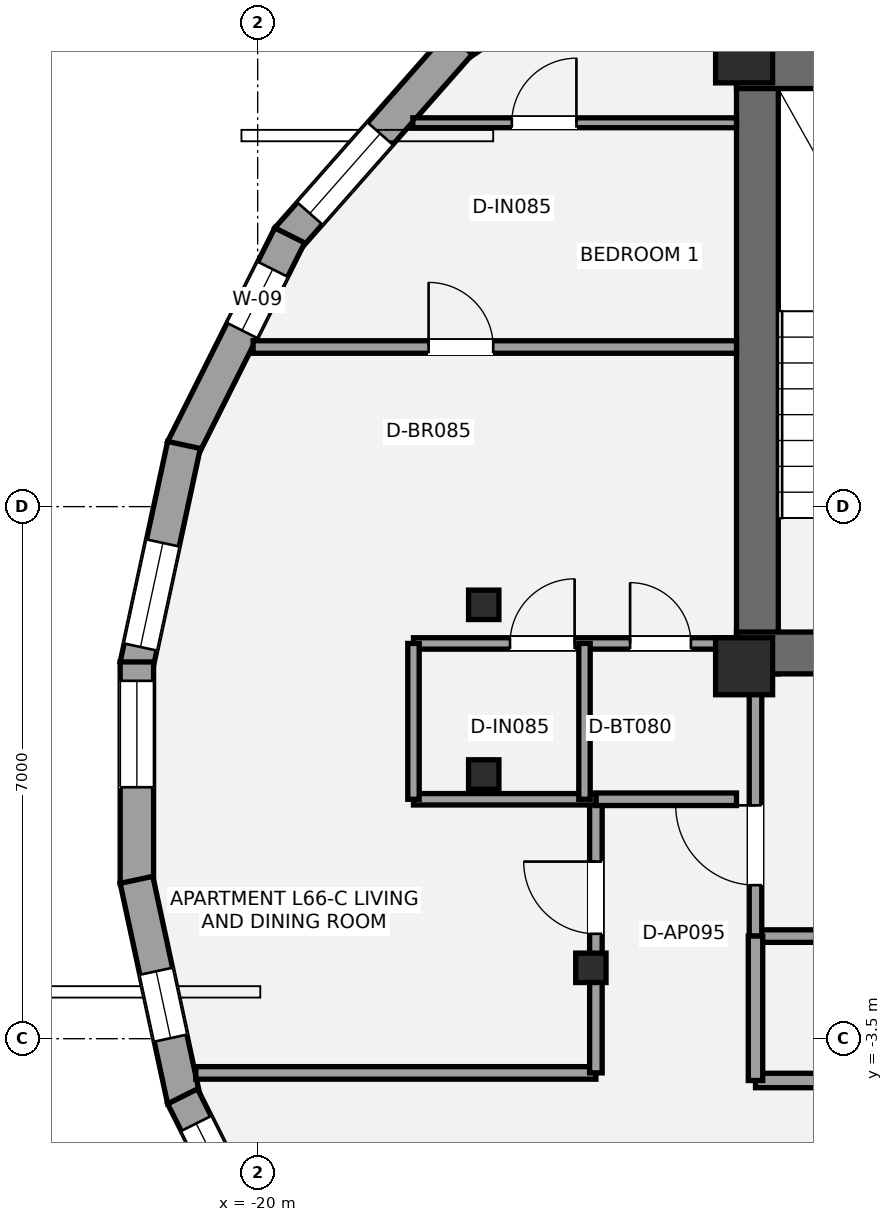
"""IFC4 building model, lengths in metres.
Left out: names, types, materials, properties, quantities, classifications, styles, units other than length and angle.
Written with IfcOpenShell. Run it as: python <this file> out.ifc"""

import sys

from ifc_helpers import new_model, si_unit, direction, frame, frame_2d, origin, origin_2d, place, context, subcontext, project, spatial, rectangle, i_section, extrude, element, fill, save


model = new_model("IFC4")
c1 = context("Model", 3, precision=1e-05, world=origin(), true_north=direction((0.0, 1.0)))
c2 = subcontext(c1, "Body", "Model", "MODEL_VIEW")
j1 = project(units=[si_unit("LENGTHUNIT", "METRE"), si_unit("PLANEANGLEUNIT", "RADIAN")], contexts=[c1])
p1 = place(None, origin())
s1 = spatial("IfcSite", under=j1, at=p1, CompositionType="ELEMENT")
p2 = place(p1, origin())
s2 = spatial("IfcBuilding", under=s1, at=p2, CompositionType="ELEMENT")
p3 = place(p2, frame((0.0, 0.0, 235.2)))
s3 = spatial("IfcBuildingStorey", under=s2, at=p3, CompositionType="ELEMENT", Elevation=235.2)
p4 = place(p3, frame((-13.425, 1.3, 0.0), z_axis=(0.0, 0.0, 1.0), x_axis=(0.0, 1.0, 0.0)))
e1 = element("IfcWall", 1, at=p4, inside=s3, PredefinedType="SHEAR", context=c2, shape_type="SweptSolid", body=[
    extrude(rectangle(XDim=8.25, YDim=0.55, at=frame_2d((4.125, 0.0))), origin(), (0.0, 0.0, 1.0), 3.15),
])
p5 = place(p3, frame((-13.7, 9.275, 0.0), z_axis=(0.0, 0.0, 1.0), x_axis=(1.0, 0.0, 0.0)))
e2 = element("IfcWall", 2, at=p5, inside=s3, PredefinedType="SHEAR", context=c2, shape_type="SweptSolid", body=[
    extrude(rectangle(XDim=9.175, YDim=0.55, at=frame_2d((4.587, 0.0))), origin(), (0.0, 0.0, 1.0), 3.15),
])
p6 = place(p3, frame((-4.925, 1.575, 0.0), z_axis=(0.0, 0.0, 1.0), x_axis=(-1.0, 0.0, 0.0)))
e3 = element("IfcWall", 3, at=p6, inside=s3, PredefinedType="SHEAR", context=c2, shape_type="SweptSolid", body=[
    extrude(rectangle(XDim=8.775, YDim=0.55, at=frame_2d((4.387, 0.0))), origin(), (0.0, 0.0, 1.0), 3.15),
])
p7 = place(p6, frame((5.375, 0.0, 0.0)))
e4 = element("IfcOpeningElement", 4, at=p7, cuts=e3, PredefinedType="OPENING", context=c2, shape_type="SweptSolid", body=[
    extrude(rectangle(XDim=1.05, YDim=2.15, at=frame_2d((0.525, 1.075))), frame((0.0, 0.285, 0.0), z_axis=(0.0, -1.0, 0.0), x_axis=(1.0, 0.0, 0.0)), (0.0, 0.0, 1.0), 0.57),
])
p8 = place(p6, frame((3.705, 0.0, 0.0)))
e5 = element("IfcOpeningElement", 5, at=p8, cuts=e3, PredefinedType="OPENING", context=c2, shape_type="SweptSolid", body=[
    extrude(rectangle(XDim=1.1, YDim=2.2, at=frame_2d((0.55, 1.1))), frame((0.0, 0.285, 0.0), z_axis=(0.0, -1.0, 0.0), x_axis=(1.0, 0.0, 0.0)), (0.0, 0.0, 1.0), 0.57),
])
for number, where, z_axis, x_axis in (
    (6, (-13.6, 1.4, 0.0), (0.0, 0.0, 1.0), (1.0, 0.0, 0.0)),
    (7, (-13.6, 9.45, 0.0), (0.0, 0.0, 1.0), (1.0, 0.0, 0.0)),
):
    element("IfcColumn", number, at=place(p3, frame(where, z_axis=z_axis, x_axis=x_axis)), inside=s3, PredefinedType="PILASTER", context=c2, shape_type="SweptSolid", body=[
        extrude(rectangle(XDim=0.75, YDim=0.75, at=origin_2d()), origin(), (0.0, 0.0, 1.0), 3.15),
    ])
for number, where, z_axis, x_axis in (
    (8, (-17.026, 2.208, 0.0), (0.0, 0.0, 1.0), (1.0, 0.0, 0.0)),
    (9, (-17.026, -0.024, 0.0), (0.0, 0.0, 1.0), (1.0, 0.0, 0.0)),
    (10, (-15.616, -2.567, 0.0), (0.0, 0.0, 1.0), (1.0, 0.0, 0.0)),
):
    element("IfcColumn", number, at=place(p3, frame(where, z_axis=z_axis, x_axis=x_axis)), inside=s3, PredefinedType="COLUMN", context=c2, shape_type="SweptSolid", body=[
        extrude(i_section(OverallWidth=0.399, OverallDepth=0.387, WebThickness=0.021, FlangeThickness=0.033, at=origin_2d()), origin(), (0.0, 0.0, 1.0), 3.15),
    ])
p9 = place(p3, frame((-17.381, 9.559, 0.0), z_axis=(0.0, 0.0, 1.0), x_axis=(0.827637036896, 0.561263694851, 0.0)))
e11 = element("IfcWall", 11, at=p9, inside=s3, PredefinedType="STANDARD", context=c2, shape_type="SweptSolid", body=[
    extrude(rectangle(XDim=3.793, YDim=0.44, at=frame_2d((1.896, 0.0))), origin(), (0.0, 0.0, 1.0), 2.336),
])
p10 = place(p9, frame((1.544, 0.0, 0.55)))
e12 = element("IfcOpeningElement", 12, at=p10, cuts=e11, PredefinedType="OPENING", context=c2, shape_type="SweptSolid", body=[
    extrude(rectangle(XDim=1.75, YDim=1.55, at=frame_2d((0.875, 0.775))), frame((0.0, 0.23, 0.0), z_axis=(0.0, -1.0, 0.0), x_axis=(1.0, 0.0, 0.0)), (0.0, 0.0, 1.0), 0.46),
])
p11 = place(p3, frame((-19.61, 7.022, 0.0), z_axis=(0.0, 0.0, 1.0), x_axis=(0.66136043846, 0.750068243855, 0.0)))
e13 = element("IfcWall", 13, at=p11, inside=s3, PredefinedType="STANDARD", context=c2, shape_type="SweptSolid", body=[
    extrude(rectangle(XDim=3.432, YDim=0.44, at=frame_2d((1.716, 0.0))), origin(), (0.0, 0.0, 1.0), 2.336),
])
p12 = place(p11, frame((0.447, 0.0, 0.58)))
e14 = element("IfcOpeningElement", 14, at=p12, cuts=e13, PredefinedType="OPENING", context=c2, shape_type="SweptSolid", body=[
    extrude(rectangle(XDim=1.4, YDim=1.55, at=frame_2d((0.7, 0.775))), frame((0.0, 0.23, 0.0), z_axis=(0.0, -1.0, 0.0), x_axis=(1.0, 0.0, 0.0)), (0.0, 0.0, 1.0), 0.46),
])
p13 = place(p3, frame((-20.988, 4.259, 0.0), z_axis=(0.0, 0.0, 1.0), x_axis=(0.448424724145, 0.893820601002, 0.0)))
e15 = element("IfcWall", 15, at=p13, inside=s3, PredefinedType="STANDARD", context=c2, shape_type="SweptSolid", body=[
    extrude(rectangle(XDim=3.144, YDim=0.44, at=frame_2d((1.572, 0.0))), origin(), (0.0, 0.0, 1.0), 2.336),
])
p14 = place(p13, frame((1.745, 0.0, 0.58)))
e16 = element("IfcOpeningElement", 16, at=p14, cuts=e15, PredefinedType="OPENING", context=c2, shape_type="SweptSolid", body=[
    extrude(rectangle(XDim=0.9, YDim=1.35, at=frame_2d((0.45, 0.675))), frame((0.0, 0.23, 0.0), z_axis=(0.0, -1.0, 0.0), x_axis=(1.0, 0.0, 0.0)), (0.0, 0.0, 1.0), 0.46),
])
p15 = place(p3, frame((-21.594, 1.41, 0.0), z_axis=(0.0, 0.0, 1.0), x_axis=(0.210540350534, 0.977585168053, 0.0)))
e17 = element("IfcWall", 17, at=p15, inside=s3, PredefinedType="STANDARD", context=c2, shape_type="SweptSolid", body=[
    extrude(rectangle(XDim=2.967, YDim=0.44, at=frame_2d((1.484, 0.0))), origin(), (0.0, 0.0, 1.0), 2.336),
])
p16 = place(p15, frame((0.249, 0.0, 0.58)))
e18 = element("IfcOpeningElement", 18, at=p16, cuts=e17, PredefinedType="OPENING", context=c2, shape_type="SweptSolid", body=[
    extrude(rectangle(XDim=1.4, YDim=1.55, at=frame_2d((0.7, 0.775))), frame((0.0, 0.23, 0.0), z_axis=(0.0, -1.0, 0.0), x_axis=(1.0, 0.0, 0.0)), (0.0, 0.0, 1.0), 0.46),
])
p17 = place(p3, frame((-21.589, -1.457, 0.0), z_axis=(0.0, 0.0, 1.0), x_axis=(0.0, 1.0, 0.0)))
e19 = element("IfcWall", 19, at=p17, inside=s3, PredefinedType="STANDARD", context=c2, shape_type="SweptSolid", body=[
    extrude(rectangle(XDim=2.913, YDim=0.44, at=frame_2d((1.457, 0.0))), origin(), (0.0, 0.0, 1.0), 2.336),
])
p18 = place(p17, frame((1.265, 0.0, 0.55)))
e20 = element("IfcOpeningElement", 20, at=p18, cuts=e19, PredefinedType="OPENING", context=c2, shape_type="SweptSolid", body=[
    extrude(rectangle(XDim=1.4, YDim=1.55, at=frame_2d((0.7, 0.775))), frame((0.0, 0.23, 0.0), z_axis=(0.0, -1.0, 0.0), x_axis=(1.0, 0.0, 0.0)), (0.0, 0.0, 1.0), 0.46),
])
p19 = place(p3, frame((-20.969, -4.311, 0.0), z_axis=(0.0, 0.0, 1.0), x_axis=(-0.210540350534, 0.977585168053, 0.0)))
e21 = element("IfcWall", 21, at=p19, inside=s3, PredefinedType="STANDARD", context=c2, shape_type="SweptSolid", body=[
    extrude(rectangle(XDim=2.967, YDim=0.44, at=frame_2d((1.484, 0.0))), origin(), (0.0, 0.0, 1.0), 2.336),
])
p20 = place(p19, frame((0.838, 0.0, 0.58)))
e22 = element("IfcOpeningElement", 22, at=p20, cuts=e21, PredefinedType="OPENING", context=c2, shape_type="SweptSolid", body=[
    extrude(rectangle(XDim=0.9, YDim=1.35, at=frame_2d((0.45, 0.675))), frame((0.0, 0.23, 0.0), z_axis=(0.0, -1.0, 0.0), x_axis=(1.0, 0.0, 0.0)), (0.0, 0.0, 1.0), 0.46),
])
p21 = place(p3, frame((-19.578, -7.069, 0.0), z_axis=(0.0, 0.0, 1.0), x_axis=(-0.448424724145, 0.893820601002, 0.0)))
e23 = element("IfcWall", 23, at=p21, inside=s3, PredefinedType="STANDARD", context=c2, shape_type="SweptSolid", body=[
    extrude(rectangle(XDim=3.144, YDim=0.44, at=frame_2d((1.572, 0.0))), origin(), (0.0, 0.0, 1.0), 2.336),
])
p22 = place(p21, frame((1.344, 0.0, 0.58)))
e24 = element("IfcOpeningElement", 24, at=p22, cuts=e23, PredefinedType="OPENING", context=c2, shape_type="SweptSolid", body=[
    extrude(rectangle(XDim=1.4, YDim=1.55, at=frame_2d((0.7, 0.775))), frame((0.0, 0.23, 0.0), z_axis=(0.0, -1.0, 0.0), x_axis=(1.0, 0.0, 0.0)), (0.0, 0.0, 1.0), 0.46),
])
p23 = place(p3, frame((-13.45, -2.15, 0.0), z_axis=(0.0, 0.0, 1.0), x_axis=(1.0, 0.0, 0.0)))
e25 = element("IfcWall", 25, at=p23, inside=s3, PredefinedType="PARTITIONING", context=c2, shape_type="SweptSolid", body=[
    extrude(rectangle(XDim=6.25, YDim=0.165, at=frame_2d((3.125, 0.0))), origin(), (0.0, 0.0, 1.0), 2.423),
])
p24 = place(p3, frame((-13.45, -2.15, 0.0), z_axis=(0.0, 0.0, 1.0), x_axis=(0.0, 1.0, 0.0)))
e26 = element("IfcWall", 26, at=p24, inside=s3, PredefinedType="PARTITIONING", context=c2, shape_type="SweptSolid", body=[
    extrude(rectangle(XDim=3.5, YDim=0.165, at=frame_2d((1.75, 0.0))), origin(), (0.0, 0.0, 1.0), 2.423),
])
p25 = place(p24, frame((0.67, 0.0, 0.0)))
e27 = element("IfcOpeningElement", 27, at=p25, cuts=e26, PredefinedType="OPENING", context=c2, shape_type="SweptSolid", body=[
    extrude(rectangle(XDim=1.05, YDim=2.15, at=frame_2d((0.525, 1.075))), frame((0.0, 0.093, 0.0), z_axis=(0.0, -1.0, 0.0), x_axis=(1.0, 0.0, 0.0)), (0.0, 0.0, 1.0), 0.185),
])
p26 = place(p3, frame((-13.45, -4.05, 0.0), z_axis=(0.0, 0.0, 1.0), x_axis=(1.0, 0.0, 0.0)))
e28 = element("IfcWall", 28, at=p26, inside=s3, PredefinedType="PLUMBINGWALL", context=c2, shape_type="SweptSolid", body=[
    extrude(rectangle(XDim=11.35, YDim=0.19, at=frame_2d((5.675, 0.0))), origin(), (0.0, 0.0, 1.0), 2.357),
])
p27 = place(p26, frame((1.25, 0.0, 0.0)))
e29 = element("IfcOpeningElement", 29, at=p27, cuts=e28, PredefinedType="OPENING", context=c2, shape_type="SweptSolid", body=[
    extrude(rectangle(XDim=0.95, YDim=2.15, at=frame_2d((0.475, 1.075))), frame((0.0, 0.105, 0.0), z_axis=(0.0, -1.0, 0.0), x_axis=(1.0, 0.0, 0.0)), (0.0, 0.0, 1.0), 0.21),
])
p28 = place(p26, frame((6.16, 0.0, 0.0)))
e30 = element("IfcOpeningElement", 30, at=p28, cuts=e28, PredefinedType="OPENING", context=c2, shape_type="SweptSolid", body=[
    extrude(rectangle(XDim=0.9, YDim=2.1, at=frame_2d((0.45, 1.05))), frame((0.0, 0.105, 0.0), z_axis=(0.0, -1.0, 0.0), x_axis=(1.0, 0.0, 0.0)), (0.0, 0.0, 1.0), 0.21),
])
p29 = place(p3, frame((-13.45, -4.05, 0.0), z_axis=(0.0, 0.0, 1.0), x_axis=(0.0, 1.0, 0.0)))
e31 = element("IfcWall", 31, at=p29, inside=s3, PredefinedType="PLUMBINGWALL", context=c2, shape_type="SweptSolid", body=[
    extrude(rectangle(XDim=1.9, YDim=0.19, at=frame_2d((0.95, 0.0))), origin(), (0.0, 0.0, 1.0), 2.423),
])
p30 = place(p3, frame((-20.814, -3.95, 0.0), z_axis=(0.0, 0.0, 1.0), x_axis=(1.0, 0.0, 0.0)))
e32 = element("IfcWall", 32, at=p30, inside=s3, PredefinedType="PARTITIONING", context=c2, shape_type="SweptSolid", body=[
    extrude(rectangle(XDim=5.264, YDim=0.165, at=frame_2d((2.632, 0.0))), origin(), (0.0, 0.0, 1.0), 2.423),
])
p31 = place(p3, frame((-15.55, -3.95, 0.0), z_axis=(0.0, 0.0, 1.0), x_axis=(0.0, 1.0, 0.0)))
e33 = element("IfcWall", 33, at=p31, inside=s3, PredefinedType="PARTITIONING", context=c2, shape_type="SweptSolid", body=[
    extrude(rectangle(XDim=3.6, YDim=0.165, at=frame_2d((1.8, 0.0))), origin(), (0.0, 0.0, 1.0), 2.357),
])
p32 = place(p31, frame((1.83, 0.0, 0.0)))
e34 = element("IfcOpeningElement", 34, at=p32, cuts=e33, PredefinedType="OPENING", context=c2, shape_type="SweptSolid", body=[
    extrude(rectangle(XDim=0.95, YDim=2.15, at=frame_2d((0.475, 1.075))), frame((0.0, 0.093, 0.0), z_axis=(0.0, -1.0, 0.0), x_axis=(1.0, 0.0, 0.0)), (0.0, 0.0, 1.0), 0.185),
])
p33 = place(p3, frame((-15.55, -0.35, 0.0), z_axis=(0.0, 0.0, 1.0), x_axis=(1.0, 0.0, 0.0)))
e35 = element("IfcWall", 35, at=p33, inside=s3, PredefinedType="PARTITIONING", context=c2, shape_type="SweptSolid", body=[
    extrude(rectangle(XDim=1.85, YDim=0.165, at=frame_2d((0.925, 0.0))), origin(), (0.0, 0.0, 1.0), 2.97),
])
p34 = place(p3, frame((-20.06, 5.6, 0.0), z_axis=(0.0, 0.0, 1.0), x_axis=(1.0, 0.0, 0.0)))
e36 = element("IfcWall", 36, at=p34, inside=s3, PredefinedType="PARTITIONING", context=c2, shape_type="SweptSolid", body=[
    extrude(rectangle(XDim=6.36, YDim=0.165, at=frame_2d((3.18, 0.0))), origin(), (0.0, 0.0, 1.0), 2.423),
])
p35 = place(p34, frame((2.309, 0.0, 0.0)))
e37 = element("IfcOpeningElement", 37, at=p35, cuts=e36, PredefinedType="OPENING", context=c2, shape_type="SweptSolid", body=[
    extrude(rectangle(XDim=0.85, YDim=2.1, at=frame_2d((0.425, 1.05))), frame((0.0, 0.093, 0.0), z_axis=(0.0, -1.0, 0.0), x_axis=(1.0, 0.0, 0.0)), (0.0, 0.0, 1.0), 0.185),
])
p36 = place(p3, frame((-17.95, 1.7, 0.0), z_axis=(0.0, 0.0, 1.0), x_axis=(1.0, 0.0, 0.0)))
e38 = element("IfcWall", 38, at=p36, inside=s3, PredefinedType="PLUMBINGWALL", context=c2, shape_type="SweptSolid", body=[
    extrude(rectangle(XDim=4.25, YDim=0.15, at=frame_2d((2.125, 0.0))), origin(), (0.0, 0.0, 1.0), 2.423),
])
p37 = place(p36, frame((2.85, 0.0, 0.0)))
e39 = element("IfcOpeningElement", 39, at=p37, cuts=e38, PredefinedType="OPENING", context=c2, shape_type="SweptSolid", body=[
    extrude(rectangle(XDim=0.8, YDim=2.1, at=frame_2d((0.4, 1.05))), frame((0.0, 0.085, 0.0), z_axis=(0.0, -1.0, 0.0), x_axis=(1.0, 0.0, 0.0)), (0.0, 0.0, 1.0), 0.17),
])
p38 = place(p36, frame((1.27, 0.0, 0.0)))
e40 = element("IfcOpeningElement", 40, at=p38, cuts=e38, PredefinedType="OPENING", context=c2, shape_type="SweptSolid", body=[
    extrude(rectangle(XDim=0.85, YDim=2.1, at=frame_2d((0.425, 1.05))), frame((0.0, 0.085, 0.0), z_axis=(0.0, -1.0, 0.0), x_axis=(1.0, 0.0, 0.0)), (0.0, 0.0, 1.0), 0.17),
])
p39 = place(p3, frame((-17.95, -0.35, 0.0), z_axis=(0.0, 0.0, 1.0), x_axis=(1.0, 0.0, 0.0)))
e41 = element("IfcWall", 41, at=p39, inside=s3, PredefinedType="PLUMBINGWALL", context=c2, shape_type="SweptSolid", body=[
    extrude(rectangle(XDim=2.4, YDim=0.15, at=frame_2d((1.2, 0.0))), origin(), (0.0, 0.0, 1.0), 2.423),
])
for number, where, z_axis, x_axis in (
    (42, (-15.7, -0.35, 0.0), (0.0, 0.0, 1.0), (0.0, 1.0, 0.0)),
    (43, (-17.95, -0.35, 0.0), (0.0, 0.0, 1.0), (0.0, 1.0, 0.0)),
):
    element("IfcWall", number, at=place(p3, frame(where, z_axis=z_axis, x_axis=x_axis)), inside=s3, PredefinedType="PLUMBINGWALL", context=c2, shape_type="SweptSolid", body=[
        extrude(rectangle(XDim=2.05, YDim=0.15, at=frame_2d((1.025, 0.0))), origin(), (0.0, 0.0, 1.0), 2.423),
    ])
p40 = place(p3, frame((-17.958, 8.55, 0.0), z_axis=(0.0, 0.0, 1.0), x_axis=(1.0, 0.0, 0.0)))
e44 = element("IfcWall", 44, at=p40, inside=s3, PredefinedType="PARTITIONING", context=c2, shape_type="SweptSolid", body=[
    extrude(rectangle(XDim=4.258, YDim=0.13, at=frame_2d((2.129, 0.0))), origin(), (0.0, 0.0, 1.0), 2.423),
])
p41 = place(p40, frame((1.302, 0.0, 0.0)))
e45 = element("IfcOpeningElement", 45, at=p41, cuts=e44, PredefinedType="OPENING", context=c2, shape_type="SweptSolid", body=[
    extrude(rectangle(XDim=0.85, YDim=2.1, at=frame_2d((0.425, 1.05))), frame((0.0, 0.075, 0.0), z_axis=(0.0, -1.0, 0.0), x_axis=(1.0, 0.0, 0.0)), (0.0, 0.0, 1.0), 0.15),
])
p42 = place(p12, origin())
e46 = element("IfcWindow", 46, at=p42, inside=s3, PartitioningType="SINGLE_PANEL", PredefinedType="WINDOW", context=c2, shape_type="SweptSolid", body=[
    extrude(rectangle(XDim=1.4, YDim=1.55, at=frame_2d((0.7, 0.775))), frame((0.0, -0.01, 0.0), z_axis=(0.0, -1.0, 0.0), x_axis=(1.0, 0.0, 0.0)), (0.0, 0.0, 1.0), 0.06),
])
fill(e14, e46)
p43 = place(p14, origin())
e47 = element("IfcWindow", 47, at=p43, inside=s3, PartitioningType="SINGLE_PANEL", PredefinedType="WINDOW", context=c2, shape_type="SweptSolid", body=[
    extrude(rectangle(XDim=0.9, YDim=1.35, at=frame_2d((0.45, 0.675))), frame((0.0, -0.01, 0.0), z_axis=(0.0, -1.0, 0.0), x_axis=(1.0, 0.0, 0.0)), (0.0, 0.0, 1.0), 0.06),
])
fill(e16, e47)
p44 = place(p16, origin())
e48 = element("IfcWindow", 48, at=p44, inside=s3, PartitioningType="SINGLE_PANEL", PredefinedType="WINDOW", context=c2, shape_type="SweptSolid", body=[
    extrude(rectangle(XDim=1.4, YDim=1.55, at=frame_2d((0.7, 0.775))), frame((0.0, -0.01, 0.0), z_axis=(0.0, -1.0, 0.0), x_axis=(1.0, 0.0, 0.0)), (0.0, 0.0, 1.0), 0.06),
])
fill(e18, e48)
p45 = place(p18, origin())
e49 = element("IfcWindow", 49, at=p45, inside=s3, PartitioningType="SINGLE_PANEL", PredefinedType="WINDOW", context=c2, shape_type="SweptSolid", body=[
    extrude(rectangle(XDim=1.4, YDim=1.55, at=frame_2d((0.7, 0.775))), frame((0.0, -0.01, 0.0), z_axis=(0.0, -1.0, 0.0), x_axis=(1.0, 0.0, 0.0)), (0.0, 0.0, 1.0), 0.06),
])
fill(e20, e49)
p46 = place(p20, origin())
e50 = element("IfcWindow", 50, at=p46, inside=s3, PartitioningType="SINGLE_PANEL", PredefinedType="WINDOW", context=c2, shape_type="SweptSolid", body=[
    extrude(rectangle(XDim=0.9, YDim=1.35, at=frame_2d((0.45, 0.675))), frame((0.0, -0.01, 0.0), z_axis=(0.0, -1.0, 0.0), x_axis=(1.0, 0.0, 0.0)), (0.0, 0.0, 1.0), 0.06),
])
fill(e22, e50)
p47 = place(p22, origin())
e51 = element("IfcWindow", 51, at=p47, inside=s3, PartitioningType="SINGLE_PANEL", PredefinedType="WINDOW", context=c2, shape_type="SweptSolid", body=[
    extrude(rectangle(XDim=1.4, YDim=1.55, at=frame_2d((0.7, 0.775))), frame((0.0, -0.01, 0.0), z_axis=(0.0, -1.0, 0.0), x_axis=(1.0, 0.0, 0.0)), (0.0, 0.0, 1.0), 0.06),
])
fill(e24, e51)
p48 = place(p25, origin())
e52 = element("IfcDoor", 52, at=p48, inside=s3, OperationType="SINGLE_SWING_RIGHT", PredefinedType="DOOR", context=c2, shape_type="SweptSolid", body=[
    extrude(rectangle(XDim=1.05, YDim=2.15, at=frame_2d((0.525, 1.075))), frame((0.0, 0.025, 0.0), z_axis=(0.0, -1.0, 0.0), x_axis=(1.0, 0.0, 0.0)), (0.0, 0.0, 1.0), 0.05),
])
fill(e27, e52)
p49 = place(p32, origin())
e53 = element("IfcDoor", 53, at=p49, inside=s3, OperationType="SINGLE_SWING_RIGHT", PredefinedType="DOOR", context=c2, shape_type="SweptSolid", body=[
    extrude(rectangle(XDim=0.95, YDim=2.15, at=frame_2d((0.475, 1.075))), frame((0.0, 0.025, 0.0), z_axis=(0.0, -1.0, 0.0), x_axis=(1.0, 0.0, 0.0)), (0.0, 0.0, 1.0), 0.05),
])
fill(e34, e53)
p50 = place(p37, origin())
e54 = element("IfcDoor", 54, at=p50, inside=s3, OperationType="SINGLE_SWING_LEFT", PredefinedType="DOOR", context=c2, shape_type="SweptSolid", body=[
    extrude(rectangle(XDim=0.8, YDim=2.1, at=frame_2d((0.4, 1.05))), frame((0.0, 0.025, 0.0), z_axis=(0.0, -1.0, 0.0), x_axis=(1.0, 0.0, 0.0)), (0.0, 0.0, 1.0), 0.05),
])
fill(e39, e54)
p51 = place(p38, origin())
e55 = element("IfcDoor", 55, at=p51, inside=s3, OperationType="SINGLE_SWING_RIGHT", PredefinedType="DOOR", context=c2, shape_type="SweptSolid", body=[
    extrude(rectangle(XDim=0.85, YDim=2.1, at=frame_2d((0.425, 1.05))), frame((0.0, 0.025, 0.0), z_axis=(0.0, -1.0, 0.0), x_axis=(1.0, 0.0, 0.0)), (0.0, 0.0, 1.0), 0.05),
])
fill(e40, e55)
p52 = place(p35, origin())
e56 = element("IfcDoor", 56, at=p52, inside=s3, OperationType="SINGLE_SWING_LEFT", PredefinedType="DOOR", context=c2, shape_type="SweptSolid", body=[
    extrude(rectangle(XDim=0.85, YDim=2.1, at=frame_2d((0.425, 1.05))), frame((0.0, 0.025, 0.0), z_axis=(0.0, -1.0, 0.0), x_axis=(1.0, 0.0, 0.0)), (0.0, 0.0, 1.0), 0.05),
])
fill(e37, e56)
p53 = place(p41, origin())
e57 = element("IfcDoor", 57, at=p53, inside=s3, OperationType="SINGLE_SWING_RIGHT", PredefinedType="DOOR", context=c2, shape_type="SweptSolid", body=[
    extrude(rectangle(XDim=0.85, YDim=2.1, at=frame_2d((0.425, 1.05))), frame((0.0, 0.025, 0.0), z_axis=(0.0, -1.0, 0.0), x_axis=(1.0, 0.0, 0.0)), (0.0, 0.0, 1.0), 0.05),
])
fill(e45, e57)
save(model, sys.argv[1])
